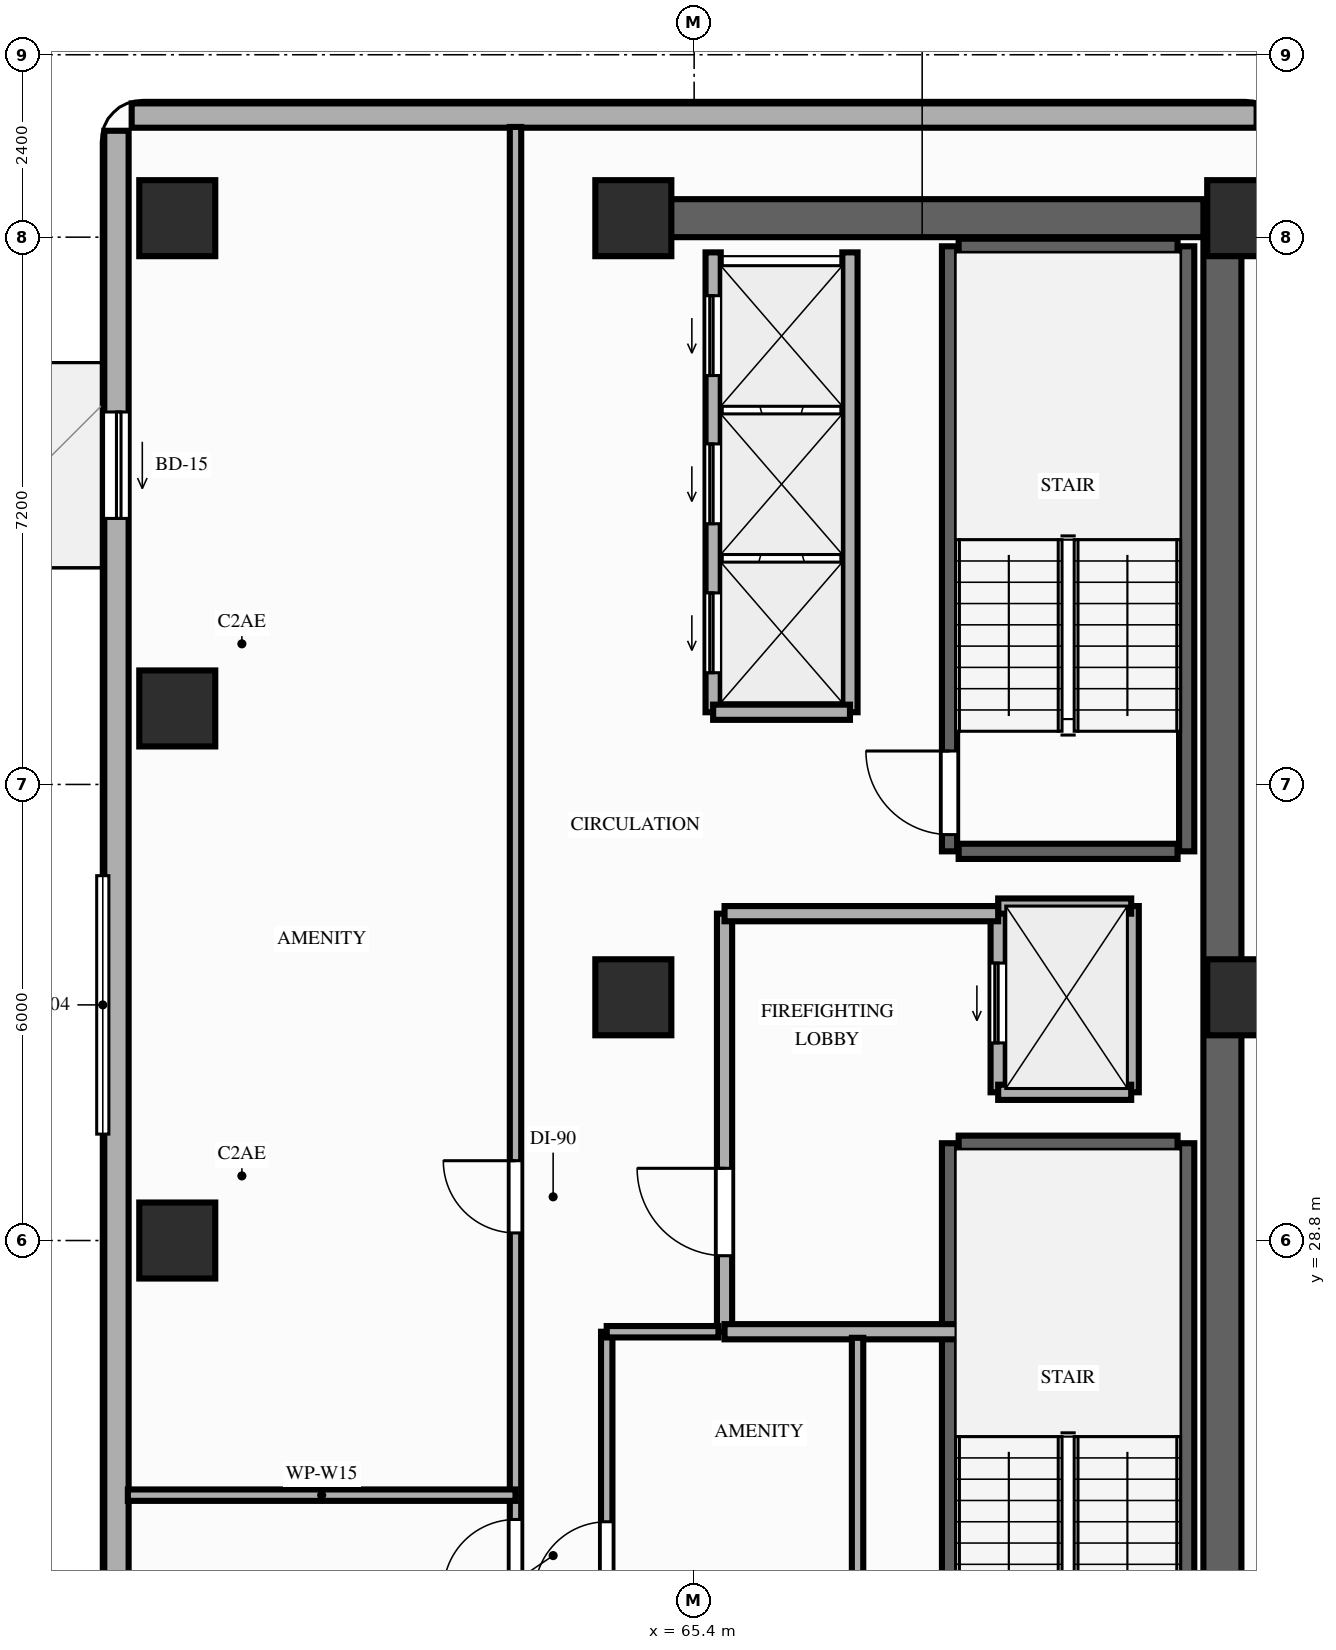
"""IFC4 building model, lengths in metres.
Left out: names, types, materials, properties, quantities, classifications, styles, units other than length and angle.
Written with IfcOpenShell. Run it as: python <this file> out.ifc"""

import sys

from ifc_helpers import new_model, si_unit, direction, frame, frame_2d, origin, origin_2d, place, context, subcontext, project, spatial, rectangle, extrude, element, fill, save


model = new_model("IFC4")
c1 = context("Model", 3, precision=1e-05, world=origin(), true_north=direction((0.0, 1.0)))
c2 = subcontext(c1, "Body", "Model", "MODEL_VIEW")
j1 = project(units=[si_unit("LENGTHUNIT", "METRE"), si_unit("PLANEANGLEUNIT", "RADIAN")], contexts=[c1])
p1 = place(None, origin())
s1 = spatial("IfcSite", under=j1, at=p1, CompositionType="ELEMENT")
p2 = place(p1, origin())
s2 = spatial("IfcBuilding", under=s1, at=p2, CompositionType="ELEMENT")
p3 = place(p2, frame((0.0, 0.0, 43.6)))
s3 = spatial("IfcBuildingStorey", under=s2, at=p3, CompositionType="ELEMENT", Elevation=43.6)
for number, where, z_axis, x_axis in (
    (1, (64.6, 32.0, 0.0), (0.0, 0.0, 1.0), (1.0, 0.0, 0.0)),
    (2, (72.65, 32.0, 0.0), (0.0, 0.0, 1.0), (1.0, 0.0, 0.0)),
    (3, (64.6, 42.25, 0.0), (0.0, 0.0, 1.0), (1.0, 0.0, 0.0)),
    (4, (72.65, 42.25, 0.0), (0.0, 0.0, 1.0), (1.0, 0.0, 0.0)),
    (5, (58.6, 28.8, 0.0), (0.0, 0.0, 1.0), (1.0, 0.0, 0.0)),
    (6, (58.6, 35.8, 0.0), (0.0, 0.0, 1.0), (1.0, 0.0, 0.0)),
    (7, (58.6, 42.25, 0.0), (0.0, 0.0, 1.0), (1.0, 0.0, 0.0)),
):
    element("IfcColumn", number, at=place(p3, frame(where, z_axis=z_axis, x_axis=x_axis)), inside=s3, PredefinedType="COLUMN", context=c2, shape_type="SweptSolid", body=[
        extrude(rectangle(XDim=1.0, YDim=1.0, at=origin_2d()), origin(), (0.0, 0.0, 1.0), 3.2),
    ])
p4 = place(p3, frame((57.8, 43.4, 0.0), z_axis=(0.0, 0.0, 1.0), x_axis=(0.0, -1.0, 0.0)))
e8 = element("IfcWall", 8, at=p4, inside=s3, PredefinedType="STANDARD", context=c2, shape_type="SweptSolid", body=[
    extrude(rectangle(XDim=22.6, YDim=0.32, at=frame_2d((11.3, 0.0))), origin(), (0.0, 0.0, 1.0), 2.5),
])
p5 = place(p4, frame((3.7, 0.0, 0.0)))
e9 = element("IfcOpeningElement", 9, at=p5, cuts=e8, PredefinedType="OPENING", context=c2, shape_type="SweptSolid", body=[
    extrude(rectangle(XDim=1.4, YDim=2.1, at=frame_2d((0.7, 1.05))), frame((0.0, 0.17, 0.0), z_axis=(0.0, -1.0, 0.0), x_axis=(1.0, 0.0, 0.0)), (0.0, 0.0, 1.0), 0.34),
])
p6 = place(p3, frame((72.8, 43.6, 0.0), z_axis=(0.0, 0.0, 1.0), x_axis=(-1.0, 0.0, 0.0)))
e10 = element("IfcWall", 10, at=p6, inside=s3, PredefinedType="STANDARD", context=c2, shape_type="SweptSolid", body=[
    extrude(rectangle(XDim=14.8, YDim=0.32, at=frame_2d((7.4, 0.0))), origin(), (0.0, 0.0, 1.0), 3.02),
])
p7 = place(p3, frame((72.35, 22.0, 0.0), z_axis=(0.0, 0.0, 1.0), x_axis=(0.0, 1.0, 0.0)))
e11 = element("IfcWall", 11, at=p7, inside=s3, PredefinedType="SHEAR", context=c2, shape_type="SweptSolid", body=[
    extrude(rectangle(XDim=20.25, YDim=0.5, at=frame_2d((10.125, 0.0))), origin(), (0.0, 0.0, 1.0), 3.02),
])
p8 = place(p3, frame((64.6, 42.25, 0.0), z_axis=(0.0, 0.0, 1.0), x_axis=(1.0, 0.0, 0.0)))
e12 = element("IfcWall", 12, at=p8, inside=s3, PredefinedType="SHEAR", context=c2, shape_type="SweptSolid", body=[
    extrude(rectangle(XDim=7.5, YDim=0.5, at=frame_2d((3.75, 0.0))), origin(), (0.0, 0.0, 1.0), 3.02),
])
p9 = place(p3, frame((68.76, 22.26, 0.0), z_axis=(0.0, 0.0, 1.0), x_axis=(0.0, 1.0, 0.0)))
e13 = element("IfcWall", 13, at=p9, inside=s3, PredefinedType="SHEAR", context=c2, shape_type="SweptSolid", body=[
    extrude(rectangle(XDim=7.82, YDim=0.2, at=frame_2d((3.91, 0.0))), origin(), (0.0, 0.0, 1.0), 3.02),
])
p10 = place(p9, frame((0.22, 0.0, 0.0)))
e14 = element("IfcOpeningElement", 14, at=p10, cuts=e13, PredefinedType="OPENING", context=c2, shape_type="SweptSolid", body=[
    extrude(rectangle(XDim=1.1, YDim=2.15, at=frame_2d((0.55, 1.075))), frame((0.0, 0.11, 0.0), z_axis=(0.0, -1.0, 0.0), x_axis=(1.0, 0.0, 0.0)), (0.0, 0.0, 1.0), 0.22),
])
p11 = place(p3, frame((71.88, 22.26, 0.0), z_axis=(0.0, 0.0, 1.0), x_axis=(0.0, 1.0, 0.0)))
e15 = element("IfcWall", 15, at=p11, inside=s3, PredefinedType="SHEAR", context=c2, shape_type="SweptSolid", body=[
    extrude(rectangle(XDim=7.82, YDim=0.2, at=frame_2d((3.91, 0.0))), origin(), (0.0, 0.0, 1.0), 3.02),
])
p12 = place(p3, frame((68.88, 30.08, 0.0), z_axis=(0.0, 0.0, 1.0), x_axis=(1.0, 0.0, 0.0)))
e16 = element("IfcWall", 16, at=p12, inside=s3, PredefinedType="SHEAR", context=c2, shape_type="SweptSolid", body=[
    extrude(rectangle(XDim=2.88, YDim=0.2, at=frame_2d((1.44, 0.0))), origin(), (0.0, 0.0, 1.0), 3.02),
])
p13 = place(p3, frame((68.76, 33.92, 0.0), z_axis=(0.0, 0.0, 1.0), x_axis=(0.0, 1.0, 0.0)))
e17 = element("IfcWall", 17, at=p13, inside=s3, PredefinedType="SHEAR", context=c2, shape_type="SweptSolid", body=[
    extrude(rectangle(XDim=7.96, YDim=0.2, at=frame_2d((3.98, 0.0))), origin(), (0.0, 0.0, 1.0), 3.02),
])
p14 = place(p13, frame((0.22, 0.0, 0.0)))
e18 = element("IfcOpeningElement", 18, at=p14, cuts=e17, PredefinedType="OPENING", context=c2, shape_type="SweptSolid", body=[
    extrude(rectangle(XDim=1.1, YDim=2.15, at=frame_2d((0.55, 1.075))), frame((0.0, 0.11, 0.0), z_axis=(0.0, -1.0, 0.0), x_axis=(1.0, 0.0, 0.0)), (0.0, 0.0, 1.0), 0.22),
])
p15 = place(p3, frame((71.88, 33.92, 0.0), z_axis=(0.0, 0.0, 1.0), x_axis=(0.0, 1.0, 0.0)))
e19 = element("IfcWall", 19, at=p15, inside=s3, PredefinedType="SHEAR", context=c2, shape_type="SweptSolid", body=[
    extrude(rectangle(XDim=7.96, YDim=0.2, at=frame_2d((3.98, 0.0))), origin(), (0.0, 0.0, 1.0), 3.02),
])
for number, where, z_axis, x_axis in (
    (20, (68.88, 41.88, 0.0), (0.0, 0.0, 1.0), (1.0, 0.0, 0.0)),
    (21, (68.88, 33.92, 0.0), (0.0, 0.0, 1.0), (1.0, 0.0, 0.0)),
):
    element("IfcWall", number, at=place(p3, frame(where, z_axis=z_axis, x_axis=x_axis)), inside=s3, PredefinedType="SHEAR", context=c2, shape_type="SweptSolid", body=[
        extrude(rectangle(XDim=2.88, YDim=0.2, at=frame_2d((1.44, 0.0))), origin(), (0.0, 0.0, 1.0), 3.02),
    ])
p16 = place(p3, frame((65.65, 35.75, 0.0), z_axis=(0.0, 0.0, 1.0), x_axis=(0.0, 1.0, 0.0)))
e22 = element("IfcWall", 22, at=p16, inside=s3, PredefinedType="MOVABLE", context=c2, shape_type="SweptSolid", body=[
    extrude(rectangle(XDim=6.05, YDim=0.2, at=frame_2d((3.025, 0.0))), origin(), (0.0, 0.0, 1.0), 3.02),
])
p17 = place(p16, frame((0.52, 0.0, 0.0)))
e23 = element("IfcOpeningElement", 23, at=p17, cuts=e22, PredefinedType="OPENING", context=c2, shape_type="SweptSolid", body=[
    extrude(rectangle(XDim=1.05, YDim=2.15, at=frame_2d((0.525, 1.075))), frame((0.0, 0.11, 0.0), z_axis=(0.0, -1.0, 0.0), x_axis=(1.0, 0.0, 0.0)), (0.0, 0.0, 1.0), 0.22),
])
p18 = place(p16, frame((2.48, 0.0, 0.0)))
e24 = element("IfcOpeningElement", 24, at=p18, cuts=e22, PredefinedType="OPENING", context=c2, shape_type="SweptSolid", body=[
    extrude(rectangle(XDim=1.05, YDim=2.15, at=frame_2d((0.525, 1.075))), frame((0.0, 0.11, 0.0), z_axis=(0.0, -1.0, 0.0), x_axis=(1.0, 0.0, 0.0)), (0.0, 0.0, 1.0), 0.22),
])
p19 = place(p16, frame((4.43, 0.0, 0.0)))
e25 = element("IfcOpeningElement", 25, at=p19, cuts=e22, PredefinedType="OPENING", context=c2, shape_type="SweptSolid", body=[
    extrude(rectangle(XDim=1.05, YDim=2.15, at=frame_2d((0.525, 1.075))), frame((0.0, 0.11, 0.0), z_axis=(0.0, -1.0, 0.0), x_axis=(1.0, 0.0, 0.0)), (0.0, 0.0, 1.0), 0.22),
])
p20 = place(p3, frame((67.45, 35.75, 0.0), z_axis=(0.0, 0.0, 1.0), x_axis=(0.0, 1.0, 0.0)))
e26 = element("IfcWall", 26, at=p20, inside=s3, PredefinedType="MOVABLE", context=c2, shape_type="SweptSolid", body=[
    extrude(rectangle(XDim=6.05, YDim=0.2, at=frame_2d((3.025, 0.0))), origin(), (0.0, 0.0, 1.0), 3.02),
])
p21 = place(p3, frame((65.65, 35.75, 0.0), z_axis=(0.0, 0.0, 1.0), x_axis=(1.0, 0.0, 0.0)))
e27 = element("IfcWall", 27, at=p21, inside=s3, PredefinedType="MOVABLE", context=c2, shape_type="SweptSolid", body=[
    extrude(rectangle(XDim=1.8, YDim=0.2, at=frame_2d((0.9, 0.0))), origin(), (0.0, 0.0, 1.0), 3.02),
])
p22 = place(p3, frame((69.4, 30.75, 0.0), z_axis=(0.0, 0.0, 1.0), x_axis=(0.0, 1.0, 0.0)))
e28 = element("IfcWall", 28, at=p22, inside=s3, PredefinedType="MOVABLE", context=c2, shape_type="SweptSolid", body=[
    extrude(rectangle(XDim=2.45, YDim=0.2, at=frame_2d((1.225, 0.0))), origin(), (0.0, 0.0, 1.0), 3.02),
])
p23 = place(p22, frame((0.65, 0.0, 0.0)))
e29 = element("IfcOpeningElement", 29, at=p23, cuts=e28, PredefinedType="OPENING", context=c2, shape_type="SweptSolid", body=[
    extrude(rectangle(XDim=1.05, YDim=2.15, at=frame_2d((0.525, 1.075))), frame((0.0, 0.11, 0.0), z_axis=(0.0, -1.0, 0.0), x_axis=(1.0, 0.0, 0.0)), (0.0, 0.0, 1.0), 0.22),
])
p24 = place(p3, frame((71.15, 30.75, 0.0), z_axis=(0.0, 0.0, 1.0), x_axis=(0.0, 1.0, 0.0)))
e30 = element("IfcWall", 30, at=p24, inside=s3, PredefinedType="MOVABLE", context=c2, shape_type="SweptSolid", body=[
    extrude(rectangle(XDim=2.45, YDim=0.2, at=frame_2d((1.225, 0.0))), origin(), (0.0, 0.0, 1.0), 3.02),
])
for number, where, z_axis, x_axis in (
    (31, (69.4, 33.2, 0.0), (0.0, 0.0, 1.0), (1.0, 0.0, 0.0)),
    (32, (69.4, 30.75, 0.0), (0.0, 0.0, 1.0), (1.0, 0.0, 0.0)),
):
    element("IfcWall", number, at=place(p3, frame(where, z_axis=z_axis, x_axis=x_axis)), inside=s3, PredefinedType="MOVABLE", context=c2, shape_type="SweptSolid", body=[
        extrude(rectangle(XDim=1.75, YDim=0.2, at=frame_2d((0.875, 0.0))), origin(), (0.0, 0.0, 1.0), 3.02),
    ])
p25 = place(p3, frame((65.8, 27.6, 0.0), z_axis=(0.0, 0.0, 1.0), x_axis=(0.0, 1.0, 0.0)))
e33 = element("IfcWall", 33, at=p25, inside=s3, PredefinedType="PARTITIONING", context=c2, shape_type="SweptSolid", body=[
    extrude(rectangle(XDim=5.5, YDim=0.2, at=frame_2d((2.75, 0.0))), origin(), (0.0, 0.0, 1.0), 3.02),
])
p26 = place(p25, frame((1.0, 0.0, 0.0)))
e34 = element("IfcOpeningElement", 34, at=p26, cuts=e33, PredefinedType="OPENING", context=c2, shape_type="SweptSolid", body=[
    extrude(rectangle(XDim=1.15, YDim=2.15, at=frame_2d((0.575, 1.075))), frame((0.0, 0.11, 0.0), z_axis=(0.0, -1.0, 0.0), x_axis=(1.0, 0.0, 0.0)), (0.0, 0.0, 1.0), 0.22),
])
p27 = place(p3, frame((65.8, 33.1, 0.0), z_axis=(0.0, 0.0, 1.0), x_axis=(1.0, 0.0, 0.0)))
e35 = element("IfcWall", 35, at=p27, inside=s3, PredefinedType="PARTITIONING", context=c2, shape_type="SweptSolid", body=[
    extrude(rectangle(XDim=3.6, YDim=0.2, at=frame_2d((1.8, 0.0))), origin(), (0.0, 0.0, 1.0), 3.02),
])
p28 = place(p3, frame((65.8, 27.6, 0.0), z_axis=(0.0, 0.0, 1.0), x_axis=(1.0, 0.0, 0.0)))
e36 = element("IfcWall", 36, at=p28, inside=s3, PredefinedType="PARTITIONING", context=c2, shape_type="SweptSolid", body=[
    extrude(rectangle(XDim=3.4, YDim=0.2, at=frame_2d((1.7, 0.0))), origin(), (0.0, 0.0, 1.0), 3.02),
])
p29 = place(p3, frame((64.25, 21.05, 0.0), z_axis=(0.0, 0.0, 1.0), x_axis=(0.0, 1.0, 0.0)))
e37 = element("IfcWall", 37, at=p29, inside=s3, PredefinedType="PARTITIONING", context=c2, shape_type="SweptSolid", body=[
    extrude(rectangle(XDim=6.55, YDim=0.15, at=frame_2d((3.275, 0.0))), origin(), (0.0, 0.0, 1.0), 2.5),
])
p30 = place(p29, frame((3.1, 0.0, 0.0)))
e38 = element("IfcOpeningElement", 38, at=p30, cuts=e37, PredefinedType="OPENING", context=c2, shape_type="SweptSolid", body=[
    extrude(rectangle(XDim=0.95, YDim=2.15, at=frame_2d((0.475, 1.075))), frame((0.0, 0.085, 0.0), z_axis=(0.0, -1.0, 0.0), x_axis=(1.0, 0.0, 0.0)), (0.0, 0.0, 1.0), 0.17),
])
p31 = place(p3, frame((67.55, 21.05, 0.0), z_axis=(0.0, 0.0, 1.0), x_axis=(0.0, 1.0, 0.0)))
e39 = element("IfcWall", 39, at=p31, inside=s3, PredefinedType="PARTITIONING", context=c2, shape_type="SweptSolid", body=[
    extrude(rectangle(XDim=6.47, YDim=0.15, at=frame_2d((3.235, 0.0))), origin(), (0.0, 0.0, 1.0), 2.5),
])
p32 = place(p3, frame((64.25, 27.6, 0.0), z_axis=(0.0, 0.0, 1.0), x_axis=(1.0, 0.0, 0.0)))
e40 = element("IfcWall", 40, at=p32, inside=s3, PredefinedType="PARTITIONING", context=c2, shape_type="SweptSolid", body=[
    extrude(rectangle(XDim=1.47, YDim=0.15, at=frame_2d((0.735, 0.0))), origin(), (0.0, 0.0, 1.0), 2.5),
])
p33 = place(p3, frame((63.05, 20.75, 0.0), z_axis=(0.0, 0.0, 1.0), x_axis=(0.0, 1.0, 0.0)))
e41 = element("IfcWall", 41, at=p33, inside=s3, PredefinedType="PARTITIONING", context=c2, shape_type="SweptSolid", body=[
    extrude(rectangle(XDim=22.7, YDim=0.15, at=frame_2d((11.35, 0.0))), origin(), (0.0, 0.0, 1.0), 2.5),
])
p34 = place(p33, frame((0.73, 0.0, 0.0)))
e42 = element("IfcOpeningElement", 42, at=p34, cuts=e41, PredefinedType="OPENING", context=c2, shape_type="SweptSolid", body=[
    extrude(rectangle(XDim=0.85, YDim=2.1, at=frame_2d((0.425, 1.05))), frame((0.0, 0.085, 0.0), z_axis=(0.0, -1.0, 0.0), x_axis=(1.0, 0.0, 0.0)), (0.0, 0.0, 1.0), 0.17),
])
p35 = place(p33, frame((3.43, 0.0, 0.0)))
e43 = element("IfcOpeningElement", 43, at=p35, cuts=e41, PredefinedType="OPENING", context=c2, shape_type="SweptSolid", body=[
    extrude(rectangle(XDim=0.95, YDim=2.1, at=frame_2d((0.475, 1.05))), frame((0.0, 0.085, 0.0), z_axis=(0.0, -1.0, 0.0), x_axis=(1.0, 0.0, 0.0)), (0.0, 0.0, 1.0), 0.17),
])
p36 = place(p33, frame((8.15, 0.0, 0.0)))
e44 = element("IfcOpeningElement", 44, at=p36, cuts=e41, PredefinedType="OPENING", context=c2, shape_type="SweptSolid", body=[
    extrude(rectangle(XDim=0.95, YDim=2.15, at=frame_2d((0.475, 1.075))), frame((0.0, 0.085, 0.0), z_axis=(0.0, -1.0, 0.0), x_axis=(1.0, 0.0, 0.0)), (0.0, 0.0, 1.0), 0.17),
])
p37 = place(p3, frame((57.95, 25.45, 0.0), z_axis=(0.0, 0.0, 1.0), x_axis=(1.0, 0.0, 0.0)))
e45 = element("IfcWall", 45, at=p37, inside=s3, PredefinedType="PARTITIONING", context=c2, shape_type="SweptSolid", body=[
    extrude(rectangle(XDim=5.1, YDim=0.15, at=frame_2d((2.55, 0.0))), origin(), (0.0, 0.0, 1.0), 2.5),
])
p38 = place(p5, origin())
e46 = element("IfcDoor", 46, at=p38, inside=s3, OperationType="SLIDING_TO_RIGHT", PredefinedType="DOOR", context=c2, shape_type="SweptSolid", body=[
    extrude(rectangle(XDim=1.4, YDim=2.1, at=frame_2d((0.7, 1.05))), frame((0.0, 0.025, 0.0), z_axis=(0.0, -1.0, 0.0), x_axis=(1.0, 0.0, 0.0)), (0.0, 0.0, 1.0), 0.05),
])
fill(e9, e46)
p39 = place(p14, origin())
e47 = element("IfcDoor", 47, at=p39, inside=s3, OperationType="SINGLE_SWING_RIGHT", PredefinedType="DOOR", context=c2, shape_type="SweptSolid", body=[
    extrude(rectangle(XDim=1.1, YDim=2.15, at=frame_2d((0.55, 1.075))), frame((0.0, 0.025, 0.0), z_axis=(0.0, -1.0, 0.0), x_axis=(1.0, 0.0, 0.0)), (0.0, 0.0, 1.0), 0.05),
])
fill(e18, e47)
p40 = place(p17, origin())
e48 = element("IfcDoor", 48, at=p40, inside=s3, OperationType="SLIDING_TO_LEFT", PredefinedType="DOOR", context=c2, shape_type="SweptSolid", body=[
    extrude(rectangle(XDim=1.05, YDim=2.15, at=frame_2d((0.525, 1.075))), frame((0.0, 0.025, 0.0), z_axis=(0.0, -1.0, 0.0), x_axis=(1.0, 0.0, 0.0)), (0.0, 0.0, 1.0), 0.05),
])
fill(e23, e48)
p41 = place(p18, origin())
e49 = element("IfcDoor", 49, at=p41, inside=s3, OperationType="SLIDING_TO_LEFT", PredefinedType="DOOR", context=c2, shape_type="SweptSolid", body=[
    extrude(rectangle(XDim=1.05, YDim=2.15, at=frame_2d((0.525, 1.075))), frame((0.0, 0.025, 0.0), z_axis=(0.0, -1.0, 0.0), x_axis=(1.0, 0.0, 0.0)), (0.0, 0.0, 1.0), 0.05),
])
fill(e24, e49)
p42 = place(p19, origin())
e50 = element("IfcDoor", 50, at=p42, inside=s3, OperationType="SLIDING_TO_LEFT", PredefinedType="DOOR", context=c2, shape_type="SweptSolid", body=[
    extrude(rectangle(XDim=1.05, YDim=2.15, at=frame_2d((0.525, 1.075))), frame((0.0, 0.025, 0.0), z_axis=(0.0, -1.0, 0.0), x_axis=(1.0, 0.0, 0.0)), (0.0, 0.0, 1.0), 0.05),
])
fill(e25, e50)
p43 = place(p23, origin())
e51 = element("IfcDoor", 51, at=p43, inside=s3, OperationType="SLIDING_TO_LEFT", PredefinedType="DOOR", context=c2, shape_type="SweptSolid", body=[
    extrude(rectangle(XDim=1.05, YDim=2.15, at=frame_2d((0.525, 1.075))), frame((0.0, 0.025, 0.0), z_axis=(0.0, -1.0, 0.0), x_axis=(1.0, 0.0, 0.0)), (0.0, 0.0, 1.0), 0.05),
])
fill(e29, e51)
p44 = place(p26, origin())
e52 = element("IfcDoor", 52, at=p44, inside=s3, OperationType="SINGLE_SWING_RIGHT", PredefinedType="DOOR", context=c2, shape_type="SweptSolid", body=[
    extrude(rectangle(XDim=1.15, YDim=2.15, at=frame_2d((0.575, 1.075))), frame((0.0, 0.025, 0.0), z_axis=(0.0, -1.0, 0.0), x_axis=(1.0, 0.0, 0.0)), (0.0, 0.0, 1.0), 0.05),
])
fill(e34, e52)
p45 = place(p30, origin())
e53 = element("IfcDoor", 53, at=p45, inside=s3, OperationType="SINGLE_SWING_LEFT", PredefinedType="DOOR", context=c2, shape_type="SweptSolid", body=[
    extrude(rectangle(XDim=0.95, YDim=2.15, at=frame_2d((0.475, 1.075))), frame((0.0, 0.025, 0.0), z_axis=(0.0, -1.0, 0.0), x_axis=(1.0, 0.0, 0.0)), (0.0, 0.0, 1.0), 0.05),
])
fill(e38, e53)
p46 = place(p35, origin())
e54 = element("IfcDoor", 54, at=p46, inside=s3, OperationType="SINGLE_SWING_LEFT", PredefinedType="DOOR", context=c2, shape_type="SweptSolid", body=[
    extrude(rectangle(XDim=0.95, YDim=2.1, at=frame_2d((0.475, 1.05))), frame((0.0, 0.025, 0.0), z_axis=(0.0, -1.0, 0.0), x_axis=(1.0, 0.0, 0.0)), (0.0, 0.0, 1.0), 0.05),
])
fill(e43, e54)
p47 = place(p36, origin())
e55 = element("IfcDoor", 55, at=p47, inside=s3, OperationType="SINGLE_SWING_RIGHT", PredefinedType="DOOR", context=c2, shape_type="SweptSolid", body=[
    extrude(rectangle(XDim=0.95, YDim=2.15, at=frame_2d((0.475, 1.075))), frame((0.0, 0.025, 0.0), z_axis=(0.0, -1.0, 0.0), x_axis=(1.0, 0.0, 0.0)), (0.0, 0.0, 1.0), 0.05),
])
fill(e44, e55)
save(model, sys.argv[1])
